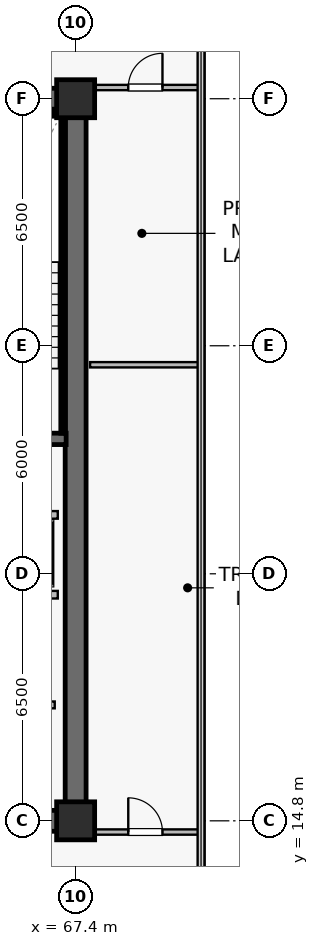
"""IFC4 building model, lengths in metres.
Left out: names, types, materials, properties, quantities, classifications, styles, units other than length and angle.
Written with IfcOpenShell. Run it as: python <this file> out.ifc"""

import sys

from ifc_helpers import new_model, si_unit, direction, frame, frame_2d, origin, origin_2d, place, context, subcontext, project, spatial, rectangle, extrude, source, transform, mapped, element, fill, save


model = new_model("IFC4")
c1 = context("Model", 3, precision=1e-05, world=origin(), true_north=direction((0.0, 1.0)))
c2 = subcontext(c1, "Body", "Model", "MODEL_VIEW")
j1 = project(units=[si_unit("LENGTHUNIT", "METRE"), si_unit("PLANEANGLEUNIT", "RADIAN")], contexts=[c1])
p1 = place(None, origin())
s1 = spatial("IfcSite", under=j1, at=p1, CompositionType="ELEMENT")
p2 = place(p1, origin())
s2 = spatial("IfcBuilding", under=s1, at=p2, CompositionType="ELEMENT")
p3 = place(p2, frame((0.0, 0.0, 209.6)))
s3 = spatial("IfcBuildingStorey", under=s2, at=p3, CompositionType="ELEMENT", Elevation=209.6)
p4 = place(p3, frame((52.325, 14.8, 0.0), z_axis=(0.0, 0.0, 1.0), x_axis=(1.0, 0.0, 0.0)))
e1 = element("IfcWall", 1, at=p4, inside=s3, PredefinedType="SHEAR", context=c2, shape_type="SweptSolid", body=[
    extrude(rectangle(XDim=15.35, YDim=0.55, at=frame_2d((7.675, 0.0))), origin(), (0.0, 0.0, 1.0), 3.8),
])
p5 = place(p3, frame((52.325, 33.8, 0.0), z_axis=(0.0, 0.0, 1.0), x_axis=(1.0, 0.0, 0.0)))
e2 = element("IfcWall", 2, at=p5, inside=s3, PredefinedType="SHEAR", context=c2, shape_type="SweptSolid", body=[
    extrude(rectangle(XDim=15.35, YDim=0.55, at=frame_2d((7.675, 0.0))), origin(), (0.0, 0.0, 1.0), 3.8),
])
p6 = place(p5, frame((9.2, 0.0, 0.0)))
e3 = element("IfcOpeningElement", 3, at=p6, cuts=e2, PredefinedType="OPENING", context=c2, shape_type="SweptSolid", body=[
    extrude(rectangle(XDim=0.95, YDim=2.15, at=frame_2d((0.475, 1.075))), frame((0.0, 0.285, 0.0), z_axis=(0.0, -1.0, 0.0), x_axis=(1.0, 0.0, 0.0)), (0.0, 0.0, 1.0), 0.57),
])
p7 = place(p5, frame((6.685, 0.0, 0.0)))
e4 = element("IfcOpeningElement", 4, at=p7, cuts=e2, PredefinedType="OPENING", context=c2, shape_type="SweptSolid", body=[
    extrude(rectangle(XDim=0.95, YDim=2.15, at=frame_2d((0.475, 1.075))), frame((0.0, 0.285, 0.0), z_axis=(0.0, -1.0, 0.0), x_axis=(1.0, 0.0, 0.0)), (0.0, 0.0, 1.0), 0.57),
])
p8 = place(p5, frame((4.135, 0.0, 0.0)))
e5 = element("IfcOpeningElement", 5, at=p8, cuts=e2, PredefinedType="OPENING", context=c2, shape_type="SweptSolid", body=[
    extrude(rectangle(XDim=0.95, YDim=2.15, at=frame_2d((0.475, 1.075))), frame((0.0, 0.285, 0.0), z_axis=(0.0, -1.0, 0.0), x_axis=(1.0, 0.0, 0.0)), (0.0, 0.0, 1.0), 0.57),
])
p9 = place(p5, frame((1.585, 0.0, 0.0)))
e6 = element("IfcOpeningElement", 6, at=p9, cuts=e2, PredefinedType="OPENING", context=c2, shape_type="SweptSolid", body=[
    extrude(rectangle(XDim=0.95, YDim=2.15, at=frame_2d((0.475, 1.075))), frame((0.0, 0.285, 0.0), z_axis=(0.0, -1.0, 0.0), x_axis=(1.0, 0.0, 0.0)), (0.0, 0.0, 1.0), 0.57),
])
p10 = place(p3, frame((67.4, 15.075, 0.0), z_axis=(0.0, 0.0, 1.0), x_axis=(0.0, 1.0, 0.0)))
e7 = element("IfcWall", 7, at=p10, inside=s3, PredefinedType="SHEAR", context=c2, shape_type="SweptSolid", body=[
    extrude(rectangle(XDim=18.45, YDim=0.55, at=frame_2d((9.225, 0.0))), origin(), (0.0, 0.0, 1.0), 3.8),
])
p11 = place(p3, frame((63.35, 24.85, 0.0), z_axis=(0.0, 0.0, 1.0), x_axis=(1.0, 0.0, 0.0)))
e8 = element("IfcWall", 8, at=p11, inside=s3, PredefinedType="SHEAR", context=c2, shape_type="SweptSolid", body=[
    extrude(rectangle(XDim=3.8, YDim=0.3, at=frame_2d((1.9, 0.0))), origin(), (0.0, 0.0, 1.0), 3.8),
])
p12 = place(p3, frame((63.35, 33.4, 0.0), z_axis=(0.0, 0.0, 1.0), x_axis=(1.0, 0.0, 0.0)))
e9 = element("IfcWall", 9, at=p12, inside=s3, PredefinedType="SOLIDWALL", context=c2, shape_type="SweptSolid", body=[
    extrude(rectangle(XDim=3.72, YDim=0.12, at=frame_2d((1.86, 0.0))), origin(), (0.0, 0.0, 1.0), 3.8),
])
p13 = place(p3, frame((67.07, 25.0, 0.0), z_axis=(0.0, 0.0, 1.0), x_axis=(0.0, 1.0, 0.0)))
e10 = element("IfcWall", 10, at=p13, inside=s3, PredefinedType="SOLIDWALL", context=c2, shape_type="SweptSolid", body=[
    extrude(rectangle(XDim=8.32, YDim=0.12, at=frame_2d((4.16, 0.0))), origin(), (0.0, 0.0, 1.0), 3.8),
])
m1 = source(origin(), c2, "Body", "SweptSolid", [
    extrude(rectangle(XDim=1.0, YDim=1.0, at=origin_2d()), origin(), (0.0, 0.0, 1.0), 4.1),
])
for number, where, z_axis, x_axis in (
    (11, (67.4, 14.8, 0.0), (0.0, 0.0, 1.0), (1.0, 0.0, 0.0)),
    (12, (67.4, 33.8, 0.0), (0.0, 0.0, 1.0), (1.0, 0.0, 0.0)),
):
    element("IfcColumn", number, at=place(p3, frame(where, z_axis=z_axis, x_axis=x_axis)), inside=s3, PredefinedType="COLUMN", context=c2, shape_type="MappedRepresentation", body=[
        mapped(m1, transform((0.0, 0.0, 0.0), scale=1.0)),
    ])
p14 = place(p3, frame((64.67, 20.75, 0.0), z_axis=(0.0, 0.0, 1.0), x_axis=(1.0, 0.0, 0.0)))
e13 = element("IfcWall", 13, at=p14, inside=s3, PredefinedType="SOLIDWALL", context=c2, shape_type="SweptSolid", body=[
    extrude(rectangle(XDim=2.26, YDim=0.2, at=frame_2d((1.13, 0.0))), origin(), (0.0, 0.0, 1.0), 3.8),
])
p15 = place(p14, frame((0.58, 0.0, 0.0)))
e14 = element("IfcOpeningElement", 14, at=p15, cuts=e13, PredefinedType="OPENING", context=c2, shape_type="SweptSolid", body=[
    extrude(rectangle(XDim=1.1, YDim=2.22, at=frame_2d((0.55, 1.11))), frame((0.0, 0.11, 0.0), z_axis=(0.0, -1.0, 0.0), x_axis=(1.0, 0.0, 0.0)), (0.0, 0.0, 1.0), 0.22),
])
p16 = place(p3, frame((64.67, 22.85, 0.0), z_axis=(0.0, 0.0, 1.0), x_axis=(1.0, 0.0, 0.0)))
e15 = element("IfcWall", 15, at=p16, inside=s3, PredefinedType="SOLIDWALL", context=c2, shape_type="SweptSolid", body=[
    extrude(rectangle(XDim=2.26, YDim=0.2, at=frame_2d((1.13, 0.0))), origin(), (0.0, 0.0, 1.0), 3.8),
])
p17 = place(p3, frame((63.6, 17.85, 0.0), z_axis=(0.0, 0.0, 1.0), x_axis=(1.0, 0.0, 0.0)))
e16 = element("IfcWall", 16, at=p17, inside=s3, PredefinedType="SOLIDWALL", context=c2, shape_type="SweptSolid", body=[
    extrude(rectangle(XDim=3.25, YDim=0.18, at=frame_2d((1.625, 0.0))), origin(), (0.0, 0.0, 1.0), 3.8),
])
p18 = place(p17, frame((1.15, 0.0, 0.0)))
e17 = element("IfcOpeningElement", 17, at=p18, cuts=e16, PredefinedType="OPENING", context=c2, shape_type="SweptSolid", body=[
    extrude(rectangle(XDim=0.95, YDim=2.15, at=frame_2d((0.475, 1.075))), frame((0.0, 0.1, 0.0), z_axis=(0.0, -1.0, 0.0), x_axis=(1.0, 0.0, 0.0)), (0.0, 0.0, 1.0), 0.2),
])
p19 = place(p3, frame((67.78, 26.8, 0.0), z_axis=(0.0, 0.0, 1.0), x_axis=(1.0, 0.0, 0.0)))
e18 = element("IfcWall", 18, at=p19, inside=s3, PredefinedType="PARTITIONING", context=c2, shape_type="SweptSolid", body=[
    extrude(rectangle(XDim=2.91, YDim=0.14, at=frame_2d((1.455, 0.0))), origin(), (0.0, 0.0, 1.0), 3.8),
])
p20 = place(p3, frame((67.78, 14.505, 0.0), z_axis=(0.0, 0.0, 1.0), x_axis=(1.0, 0.0, 0.0)))
e19 = element("IfcWall", 19, at=p20, inside=s3, PredefinedType="PARTITIONING", context=c2, shape_type="SweptSolid", body=[
    extrude(rectangle(XDim=2.91, YDim=0.14, at=frame_2d((1.455, 0.0))), origin(), (0.0, 0.0, 1.0), 3.8),
])
p21 = place(p20, frame((1.005, 0.0, 0.0)))
e20 = element("IfcOpeningElement", 20, at=p21, cuts=e19, PredefinedType="OPENING", context=c2, shape_type="SweptSolid", body=[
    extrude(rectangle(XDim=0.9, YDim=2.1, at=frame_2d((0.45, 1.05))), frame((0.0, 0.08, 0.0), z_axis=(0.0, -1.0, 0.0), x_axis=(1.0, 0.0, 0.0)), (0.0, 0.0, 1.0), 0.16),
])
p22 = place(p3, frame((67.78, 34.095, 0.0), z_axis=(0.0, 0.0, 1.0), x_axis=(1.0, 0.0, 0.0)))
e21 = element("IfcWall", 21, at=p22, inside=s3, PredefinedType="PARTITIONING", context=c2, shape_type="SweptSolid", body=[
    extrude(rectangle(XDim=2.91, YDim=0.14, at=frame_2d((1.455, 0.0))), origin(), (0.0, 0.0, 1.0), 3.8),
])
p23 = place(p22, frame((1.005, 0.0, 0.0)))
e22 = element("IfcOpeningElement", 22, at=p23, cuts=e21, PredefinedType="OPENING", context=c2, shape_type="SweptSolid", body=[
    extrude(rectangle(XDim=0.9, YDim=2.1, at=frame_2d((0.45, 1.05))), frame((0.0, 0.08, 0.0), z_axis=(0.0, -1.0, 0.0), x_axis=(1.0, 0.0, 0.0)), (0.0, 0.0, 1.0), 0.16),
])
m2 = source(origin(), c2, "Body", "SweptSolid", [
    extrude(rectangle(XDim=0.9, YDim=2.1, at=frame_2d((0.45, 1.05))), frame((0.0, 0.025, 0.0), z_axis=(0.0, -1.0, 0.0), x_axis=(1.0, 0.0, 0.0)), (0.0, 0.0, 1.0), 0.05),
])
p24 = place(p21, origin())
e23 = element("IfcDoor", 23, at=p24, inside=s3, OperationType="SINGLE_SWING_LEFT", PredefinedType="DOOR", context=c2, shape_type="MappedRepresentation", body=[
    mapped(m2, transform((0.0, 0.0, 0.0), scale=1.0)),
])
fill(e20, e23)
p25 = place(p23, origin())
e24 = element("IfcDoor", 24, at=p25, inside=s3, OperationType="SINGLE_SWING_RIGHT", PredefinedType="DOOR", context=c2, shape_type="MappedRepresentation", body=[
    mapped(m2, transform((0.0, 0.0, 0.0), scale=1.0)),
])
fill(e22, e24)
save(model, sys.argv[1])
